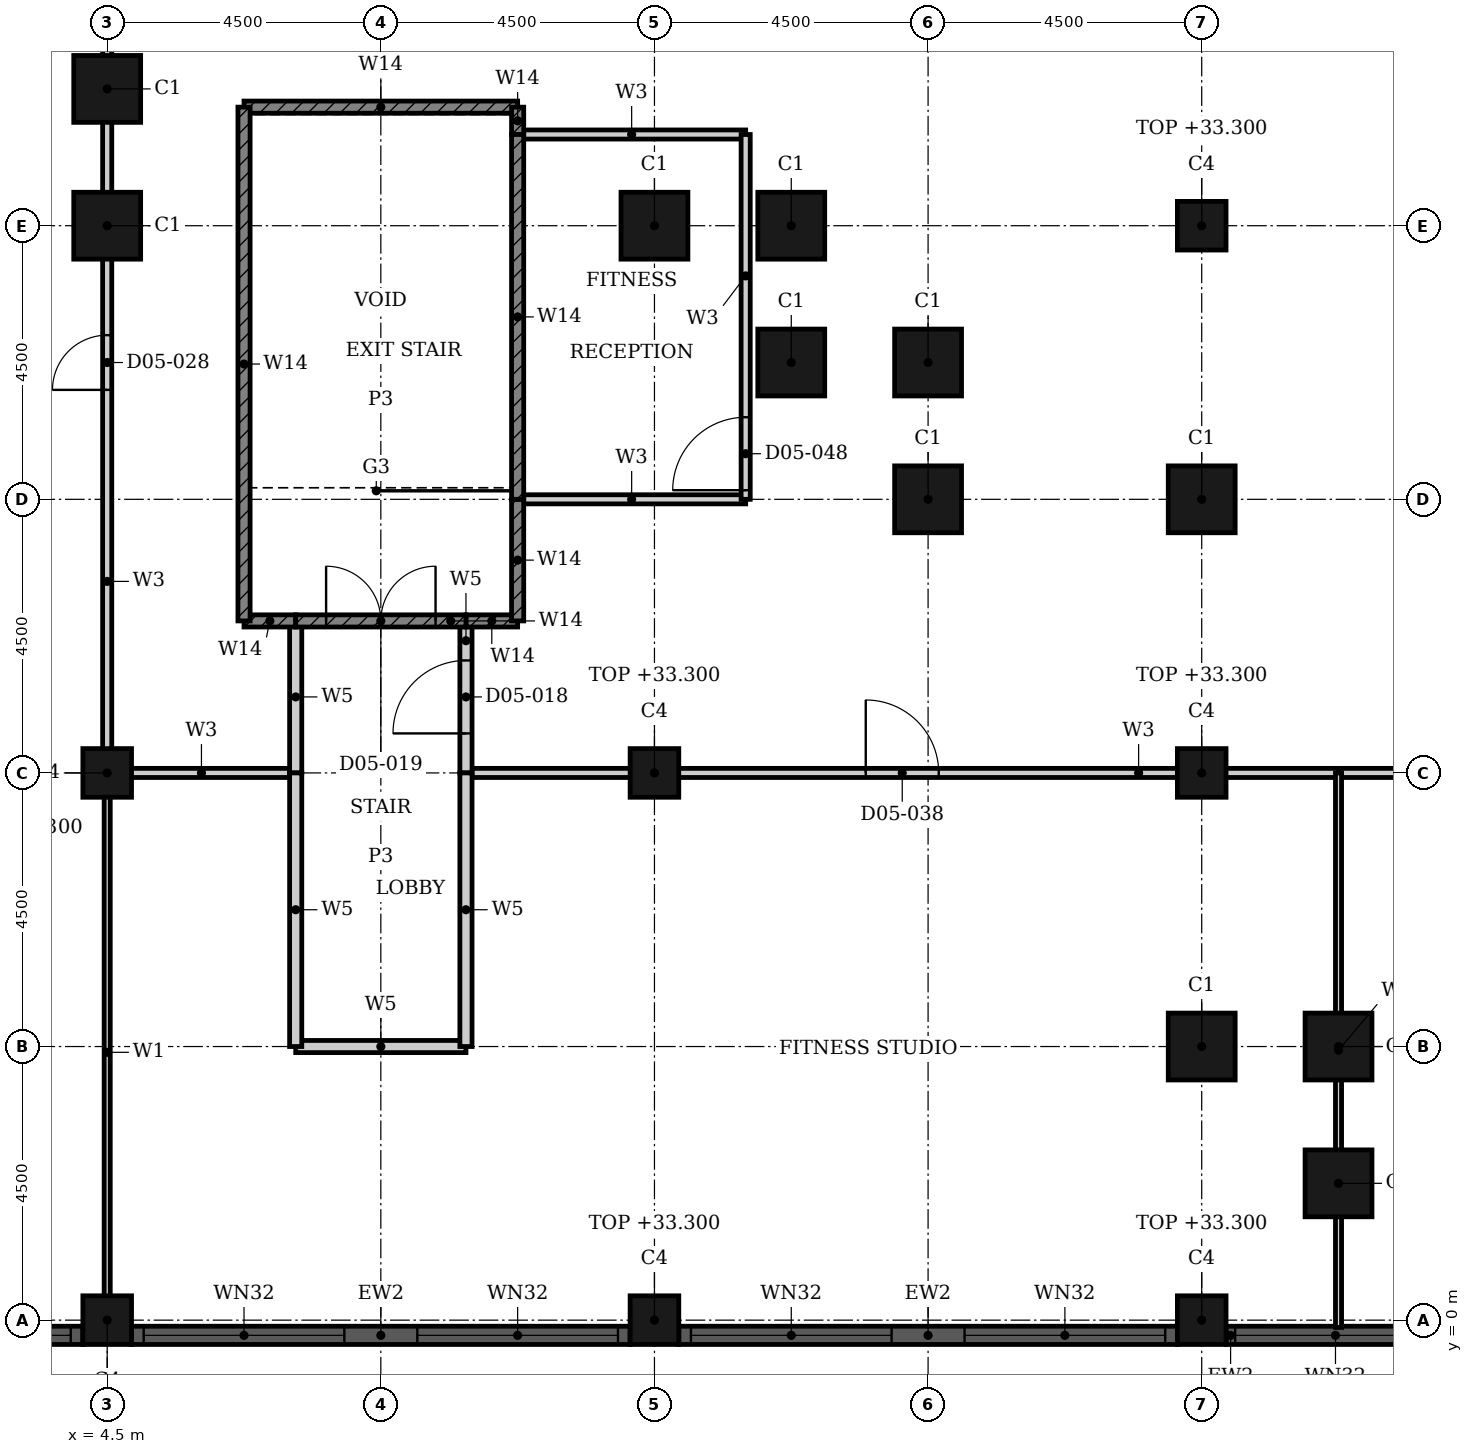
"""IFC4 building model, lengths in metres.
Left out: names, types, materials, properties, quantities, classifications, styles, units other than length and angle.
Written with IfcOpenShell. Run it as: python <this file> out.ifc"""

import sys

from ifc_helpers import new_model, si_unit, direction, frame, frame_2d, origin, origin_2d, place, context, subcontext, project, spatial, rectangle, hollow_rectangle, extrude, element, fill, save


model = new_model("IFC4")
c1 = context("Model", 3, precision=1e-05, world=origin(), true_north=direction((0.0, 1.0)))
c2 = subcontext(c1, "Body", "Model", "MODEL_VIEW")
j1 = project(units=[si_unit("LENGTHUNIT", "METRE"), si_unit("PLANEANGLEUNIT", "RADIAN")], contexts=[c1])
p1 = place(None, origin())
s1 = spatial("IfcSite", under=j1, at=p1, CompositionType="ELEMENT")
p2 = place(p1, origin())
s2 = spatial("IfcBuilding", under=s1, at=p2, CompositionType="ELEMENT")
p3 = place(p2, frame((0.0, 0.0, 28.8)))
s3 = spatial("IfcBuildingStorey", under=s2, at=p3, CompositionType="ELEMENT", Elevation=28.8)
for number, where, z_axis, x_axis in (
    (1, (22.5, 4.5, 0.0), (0.0, 0.0, 1.0), (1.0, 0.0, 0.0)),
    (2, (24.75, 4.5, 0.0), (0.0, 0.0, 1.0), (1.0, 0.0, 0.0)),
    (3, (24.75, 2.25, 0.0), (0.0, 0.0, 1.0), (1.0, 0.0, 0.0)),
    (4, (4.5, 20.25, 0.0), (0.0, 0.0, 1.0), (1.0, 0.0, 0.0)),
    (5, (4.5, 18.0, 0.0), (0.0, 0.0, 1.0), (1.0, 0.0, 0.0)),
    (6, (13.5, 18.0, 0.0), (0.0, 0.0, 1.0), (1.0, 0.0, 0.0)),
    (7, (15.75, 18.0, 0.0), (0.0, 0.0, 1.0), (1.0, 0.0, 0.0)),
    (8, (15.75, 15.75, 0.0), (0.0, 0.0, 1.0), (1.0, 0.0, 0.0)),
    (9, (18.0, 15.75, 0.0), (0.0, 0.0, 1.0), (1.0, 0.0, 0.0)),
    (10, (18.0, 13.5, 0.0), (0.0, 0.0, 1.0), (1.0, 0.0, 0.0)),
    (11, (22.5, 13.5, 0.0), (0.0, 0.0, 1.0), (1.0, 0.0, 0.0)),
):
    element("IfcColumn", number, at=place(p3, frame(where, z_axis=z_axis, x_axis=x_axis)), inside=s3, PredefinedType="COLUMN", context=c2, shape_type="SweptSolid", body=[
        extrude(hollow_rectangle(XDim=1.1, YDim=1.1, WallThickness=0.036, at=origin_2d()), origin(), (0.0, 0.0, 1.0), 4.8),
    ])
for number, where, z_axis, x_axis in (
    (12, (4.5, 0.0, 0.0), (0.0, 0.0, 1.0), (1.0, 0.0, 0.0)),
    (13, (13.5, 0.0, 0.0), (0.0, 0.0, 1.0), (1.0, 0.0, 0.0)),
    (14, (22.5, 0.0, 0.0), (0.0, 0.0, 1.0), (1.0, 0.0, 0.0)),
    (15, (4.5, 9.0, 0.0), (0.0, 0.0, 1.0), (1.0, 0.0, 0.0)),
    (16, (13.5, 9.0, 0.0), (0.0, 0.0, 1.0), (1.0, 0.0, 0.0)),
    (17, (22.5, 9.0, 0.0), (0.0, 0.0, 1.0), (1.0, 0.0, 0.0)),
    (18, (22.5, 18.0, 0.0), (0.0, 0.0, 1.0), (1.0, 0.0, 0.0)),
):
    element("IfcColumn", number, at=place(p3, frame(where, z_axis=z_axis, x_axis=x_axis)), inside=s3, PredefinedType="COLUMN", context=c2, shape_type="SweptSolid", body=[
        extrude(hollow_rectangle(XDim=0.8, YDim=0.8, WallThickness=0.025, at=origin_2d()), origin(), (0.0, 0.0, 1.0), 4.5),
    ])
p4 = place(p3, frame((-4.1, -0.25, 0.0), z_axis=(0.0, 0.0, 1.0), x_axis=(1.0, 0.0, 0.0)))
e19 = element("IfcWall", 19, at=p4, inside=s3, PredefinedType="SOLIDWALL", context=c2, shape_type="SweptSolid", body=[
    extrude(rectangle(XDim=8.2, YDim=0.3, at=frame_2d((4.1, 0.0))), origin(), (0.0, 0.0, 1.0), 4.8),
])
p5 = place(p4, frame((0.2, 0.0, 0.9)))
e20 = element("IfcOpeningElement", 20, at=p5, cuts=e19, PredefinedType="OPENING", context=c2, shape_type="SweptSolid", body=[
    extrude(rectangle(XDim=3.3, YDim=2.9, at=frame_2d((1.65, 1.45))), frame((0.0, 0.16, 0.0), z_axis=(0.0, -1.0, 0.0), x_axis=(1.0, 0.0, 0.0)), (0.0, 0.0, 1.0), 0.32),
])
p6 = place(p4, frame((4.7, 0.0, 0.9)))
e21 = element("IfcOpeningElement", 21, at=p6, cuts=e19, PredefinedType="OPENING", context=c2, shape_type="SweptSolid", body=[
    extrude(rectangle(XDim=3.3, YDim=2.9, at=frame_2d((1.65, 1.45))), frame((0.0, 0.16, 0.0), z_axis=(0.0, -1.0, 0.0), x_axis=(1.0, 0.0, 0.0)), (0.0, 0.0, 1.0), 0.32),
])
p7 = place(p3, frame((4.9, -0.25, 0.0), z_axis=(0.0, 0.0, 1.0), x_axis=(1.0, 0.0, 0.0)))
e22 = element("IfcWall", 22, at=p7, inside=s3, PredefinedType="SOLIDWALL", context=c2, shape_type="SweptSolid", body=[
    extrude(rectangle(XDim=8.2, YDim=0.3, at=frame_2d((4.1, 0.0))), origin(), (0.0, 0.0, 1.0), 4.8),
])
p8 = place(p7, frame((0.2, 0.0, 0.9)))
e23 = element("IfcOpeningElement", 23, at=p8, cuts=e22, PredefinedType="OPENING", context=c2, shape_type="SweptSolid", body=[
    extrude(rectangle(XDim=3.3, YDim=2.9, at=frame_2d((1.65, 1.45))), frame((0.0, 0.16, 0.0), z_axis=(0.0, -1.0, 0.0), x_axis=(1.0, 0.0, 0.0)), (0.0, 0.0, 1.0), 0.32),
])
p9 = place(p7, frame((4.7, 0.0, 0.9)))
e24 = element("IfcOpeningElement", 24, at=p9, cuts=e22, PredefinedType="OPENING", context=c2, shape_type="SweptSolid", body=[
    extrude(rectangle(XDim=3.3, YDim=2.9, at=frame_2d((1.65, 1.45))), frame((0.0, 0.16, 0.0), z_axis=(0.0, -1.0, 0.0), x_axis=(1.0, 0.0, 0.0)), (0.0, 0.0, 1.0), 0.32),
])
p10 = place(p3, frame((13.9, -0.25, 0.0), z_axis=(0.0, 0.0, 1.0), x_axis=(1.0, 0.0, 0.0)))
e25 = element("IfcWall", 25, at=p10, inside=s3, PredefinedType="SOLIDWALL", context=c2, shape_type="SweptSolid", body=[
    extrude(rectangle(XDim=8.2, YDim=0.3, at=frame_2d((4.1, 0.0))), origin(), (0.0, 0.0, 1.0), 4.8),
])
p11 = place(p10, frame((0.2, 0.0, 0.9)))
e26 = element("IfcOpeningElement", 26, at=p11, cuts=e25, PredefinedType="OPENING", context=c2, shape_type="SweptSolid", body=[
    extrude(rectangle(XDim=3.3, YDim=2.9, at=frame_2d((1.65, 1.45))), frame((0.0, 0.16, 0.0), z_axis=(0.0, -1.0, 0.0), x_axis=(1.0, 0.0, 0.0)), (0.0, 0.0, 1.0), 0.32),
])
p12 = place(p10, frame((4.7, 0.0, 0.9)))
e27 = element("IfcOpeningElement", 27, at=p12, cuts=e25, PredefinedType="OPENING", context=c2, shape_type="SweptSolid", body=[
    extrude(rectangle(XDim=3.3, YDim=2.9, at=frame_2d((1.65, 1.45))), frame((0.0, 0.16, 0.0), z_axis=(0.0, -1.0, 0.0), x_axis=(1.0, 0.0, 0.0)), (0.0, 0.0, 1.0), 0.32),
])
p13 = place(p3, frame((22.9, -0.25, 0.0), z_axis=(0.0, 0.0, 1.0), x_axis=(1.0, 0.0, 0.0)))
e28 = element("IfcWall", 28, at=p13, inside=s3, PredefinedType="SOLIDWALL", context=c2, shape_type="SweptSolid", body=[
    extrude(rectangle(XDim=3.55, YDim=0.3, at=frame_2d((1.775, 0.0))), origin(), (0.0, 0.0, 1.0), 4.8),
])
p14 = place(p13, frame((0.15, 0.0, 0.9)))
e29 = element("IfcOpeningElement", 29, at=p14, cuts=e28, PredefinedType="OPENING", context=c2, shape_type="SweptSolid", body=[
    extrude(rectangle(XDim=3.3, YDim=2.9, at=frame_2d((1.65, 1.45))), frame((0.0, 0.16, 0.0), z_axis=(0.0, -1.0, 0.0), x_axis=(1.0, 0.0, 0.0)), (0.0, 0.0, 1.0), 0.32),
])
for number, where, z_axis, x_axis in (
    (30, (11.25, 13.5, 0.0), (0.0, 0.0, 1.0), (1.0, 0.0, 0.0)),
    (31, (11.25, 19.5, 0.0), (0.0, 0.0, 1.0), (1.0, 0.0, 0.0)),
):
    element("IfcWall", number, at=place(p3, frame(where, z_axis=z_axis, x_axis=x_axis)), inside=s3, PredefinedType="PARTITIONING", context=c2, shape_type="SweptSolid", body=[
        extrude(rectangle(XDim=3.75, YDim=0.15, at=frame_2d((1.875, 0.0))), origin(), (0.0, 0.0, 1.0), 4.5),
    ])
p15 = place(p3, frame((4.5, 9.0, 0.0), z_axis=(0.0, 0.0, 1.0), x_axis=(1.0, 0.0, 0.0)))
e32 = element("IfcWall", 32, at=p15, inside=s3, PredefinedType="PARTITIONING", context=c2, shape_type="SweptSolid", body=[
    extrude(rectangle(XDim=3.1, YDim=0.15, at=frame_2d((1.55, 0.0))), origin(), (0.0, 0.0, 1.0), 4.5),
])
p16 = place(p3, frame((10.4, 9.0, 0.0), z_axis=(0.0, 0.0, 1.0), x_axis=(1.0, 0.0, 0.0)))
e33 = element("IfcWall", 33, at=p16, inside=s3, PredefinedType="PARTITIONING", context=c2, shape_type="SweptSolid", body=[
    extrude(rectangle(XDim=14.35, YDim=0.15, at=frame_2d((7.175, 0.0))), origin(), (0.0, 0.0, 1.0), 4.5),
])
p17 = place(p16, frame((6.575, 0.0, 0.0)))
e34 = element("IfcOpeningElement", 34, at=p17, cuts=e33, PredefinedType="OPENING", context=c2, shape_type="SweptSolid", body=[
    extrude(rectangle(XDim=1.2, YDim=2.4, at=frame_2d((0.6, 1.2))), frame((0.0, 0.085, 0.0), z_axis=(0.0, -1.0, 0.0), x_axis=(1.0, 0.0, 0.0)), (0.0, 0.0, 1.0), 0.17),
])
p18 = place(p3, frame((24.75, 9.0, 0.0), z_axis=(0.0, 0.0, 1.0), x_axis=(1.0, 0.0, 0.0)))
e35 = element("IfcWall", 35, at=p18, inside=s3, PredefinedType="PARTITIONING", context=c2, shape_type="SweptSolid", body=[
    extrude(rectangle(XDim=13.5, YDim=0.15, at=frame_2d((6.75, 0.0))), origin(), (0.0, 0.0, 1.0), 4.5),
])
p19 = place(p18, frame((4.8, 0.0, 0.0)))
e36 = element("IfcOpeningElement", 36, at=p19, cuts=e35, PredefinedType="OPENING", context=c2, shape_type="SweptSolid", body=[
    extrude(rectangle(XDim=1.2, YDim=2.4, at=frame_2d((0.6, 1.2))), frame((0.0, 0.085, 0.0), z_axis=(0.0, -1.0, 0.0), x_axis=(1.0, 0.0, 0.0)), (0.0, 0.0, 1.0), 0.17),
])
p20 = place(p3, frame((15.0, 13.5, 0.0), z_axis=(0.0, 0.0, 1.0), x_axis=(0.0, 1.0, 0.0)))
e37 = element("IfcWall", 37, at=p20, inside=s3, PredefinedType="PARTITIONING", context=c2, shape_type="SweptSolid", body=[
    extrude(rectangle(XDim=6.0, YDim=0.15, at=frame_2d((3.0, 0.0))), origin(), (0.0, 0.0, 1.0), 4.5),
])
p21 = place(p20, frame((0.15, 0.0, 0.0)))
e38 = element("IfcOpeningElement", 38, at=p21, cuts=e37, PredefinedType="OPENING", context=c2, shape_type="SweptSolid", body=[
    extrude(rectangle(XDim=1.2, YDim=2.4, at=frame_2d((0.6, 1.2))), frame((0.0, 0.085, 0.0), z_axis=(0.0, -1.0, 0.0), x_axis=(1.0, 0.0, 0.0)), (0.0, 0.0, 1.0), 0.17),
])
p22 = place(p3, frame((4.5, 9.0, 0.0), z_axis=(0.0, 0.0, 1.0), x_axis=(0.0, 1.0, 0.0)))
e39 = element("IfcWall", 39, at=p22, inside=s3, PredefinedType="PARTITIONING", context=c2, shape_type="SweptSolid", body=[
    extrude(rectangle(XDim=13.5, YDim=0.15, at=frame_2d((6.75, 0.0))), origin(), (0.0, 0.0, 1.0), 3.88),
])
p23 = place(p22, frame((6.3, 0.0, 0.0)))
e40 = element("IfcOpeningElement", 40, at=p23, cuts=e39, PredefinedType="OPENING", context=c2, shape_type="SweptSolid", body=[
    extrude(rectangle(XDim=0.9, YDim=2.1, at=frame_2d((0.45, 1.05))), frame((0.0, 0.085, 0.0), z_axis=(0.0, -1.0, 0.0), x_axis=(1.0, 0.0, 0.0)), (0.0, 0.0, 1.0), 0.17),
])
p24 = place(p3, frame((24.75, -0.12, 0.0), z_axis=(0.0, 0.0, 1.0), x_axis=(0.0, 1.0, 0.0)))
e41 = element("IfcWall", 41, at=p24, inside=s3, PredefinedType="PARTITIONING", context=c2, shape_type="SweptSolid", body=[
    extrude(rectangle(XDim=9.12, YDim=0.1, at=frame_2d((4.56, 0.0))), origin(), (0.0, 0.0, 1.0), 3.88),
])
p25 = place(p3, frame((4.5, -0.19, 0.0), z_axis=(0.0, 0.0, 1.0), x_axis=(0.0, 1.0, 0.0)))
e42 = element("IfcWall", 42, at=p25, inside=s3, PredefinedType="PARTITIONING", context=c2, shape_type="SweptSolid", body=[
    extrude(rectangle(XDim=9.19, YDim=0.1, at=frame_2d((4.595, 0.0))), origin(), (0.0, 0.0, 1.0), 4.5),
])
p26 = place(p3, frame((7.6, 4.5, 0.0), z_axis=(0.0, 0.0, 1.0), x_axis=(1.0, 0.0, 0.0)))
e43 = element("IfcWall", 43, at=p26, inside=s3, PredefinedType="PARTITIONING", context=c2, shape_type="SweptSolid", body=[
    extrude(rectangle(XDim=2.8, YDim=0.2, at=frame_2d((1.4, 0.0))), origin(), (0.0, 0.0, 1.0), 4.5),
])
p27 = place(p3, frame((10.4, 9.0, 0.0), z_axis=(0.0, 0.0, 1.0), x_axis=(0.0, 1.0, 0.0)))
e44 = element("IfcWall", 44, at=p27, inside=s3, PredefinedType="PARTITIONING", context=c2, shape_type="SweptSolid", body=[
    extrude(rectangle(XDim=2.5, YDim=0.2, at=frame_2d((1.25, 0.0))), origin(), (0.0, 0.0, 1.0), 4.5),
])
p28 = place(p27, frame((0.65, 0.0, 0.0)))
e45 = element("IfcOpeningElement", 45, at=p28, cuts=e44, PredefinedType="OPENING", context=c2, shape_type="SweptSolid", body=[
    extrude(rectangle(XDim=1.2, YDim=2.1, at=frame_2d((0.6, 1.05))), frame((0.0, 0.11, 0.0), z_axis=(0.0, -1.0, 0.0), x_axis=(1.0, 0.0, 0.0)), (0.0, 0.0, 1.0), 0.22),
])
p29 = place(p3, frame((10.4, 4.5, 0.0), z_axis=(0.0, 0.0, 1.0), x_axis=(0.0, 1.0, 0.0)))
e46 = element("IfcWall", 46, at=p29, inside=s3, PredefinedType="PARTITIONING", context=c2, shape_type="SweptSolid", body=[
    extrude(rectangle(XDim=4.5, YDim=0.2, at=frame_2d((2.25, 0.0))), origin(), (0.0, 0.0, 1.0), 4.5),
])
p30 = place(p3, frame((7.6, 9.0, 0.0), z_axis=(0.0, 0.0, 1.0), x_axis=(0.0, 1.0, 0.0)))
e47 = element("IfcWall", 47, at=p30, inside=s3, PredefinedType="PARTITIONING", context=c2, shape_type="SweptSolid", body=[
    extrude(rectangle(XDim=2.5, YDim=0.2, at=frame_2d((1.25, 0.0))), origin(), (0.0, 0.0, 1.0), 4.5),
])
p31 = place(p3, frame((7.6, 4.5, 0.0), z_axis=(0.0, 0.0, 1.0), x_axis=(0.0, 1.0, 0.0)))
e48 = element("IfcWall", 48, at=p31, inside=s3, PredefinedType="PARTITIONING", context=c2, shape_type="SweptSolid", body=[
    extrude(rectangle(XDim=4.5, YDim=0.2, at=frame_2d((2.25, 0.0))), origin(), (0.0, 0.0, 1.0), 4.5),
])
for number, where, z_axis, x_axis in (
    (49, (6.75, 11.5, 0.0), (0.0, 0.0, 1.0), (1.0, 0.0, 0.0)),
    (50, (10.4, 11.5, 0.0), (0.0, 0.0, 1.0), (1.0, 0.0, 0.0)),
):
    element("IfcWall", number, at=place(p3, frame(where, z_axis=z_axis, x_axis=x_axis)), inside=s3, PredefinedType="SHEAR", context=c2, shape_type="SweptSolid", body=[
        extrude(rectangle(XDim=0.85, YDim=0.2, at=frame_2d((0.425, 0.0))), origin(), (0.0, 0.0, 1.0), 4.5),
    ])
p32 = place(p3, frame((7.6, 11.5, 0.0), z_axis=(0.0, 0.0, 1.0), x_axis=(1.0, 0.0, 0.0)))
e51 = element("IfcWall", 51, at=p32, inside=s3, PredefinedType="SHEAR", context=c2, shape_type="SweptSolid", body=[
    extrude(rectangle(XDim=2.8, YDim=0.2, at=frame_2d((1.4, 0.0))), origin(), (0.0, 0.0, 1.0), 4.5),
])
p33 = place(p32, frame((0.5, 0.0, 0.0)))
e52 = element("IfcOpeningElement", 52, at=p33, cuts=e51, PredefinedType="OPENING", context=c2, shape_type="SweptSolid", body=[
    extrude(rectangle(XDim=1.8, YDim=2.1, at=frame_2d((0.9, 1.05))), frame((0.0, 0.11, 0.0), z_axis=(0.0, -1.0, 0.0), x_axis=(1.0, 0.0, 0.0)), (0.0, 0.0, 1.0), 0.22),
])
p34 = place(p3, frame((6.75, 19.95, 0.0), z_axis=(0.0, 0.0, 1.0), x_axis=(1.0, 0.0, 0.0)))
e53 = element("IfcWall", 53, at=p34, inside=s3, PredefinedType="SHEAR", context=c2, shape_type="SweptSolid", body=[
    extrude(rectangle(XDim=4.5, YDim=0.2, at=frame_2d((2.25, 0.0))), origin(), (0.0, 0.0, 1.0), 4.5),
])
p35 = place(p3, frame((11.25, 11.5, 0.0), z_axis=(0.0, 0.0, 1.0), x_axis=(0.0, 1.0, 0.0)))
e54 = element("IfcWall", 54, at=p35, inside=s3, PredefinedType="SHEAR", context=c2, shape_type="SweptSolid", body=[
    extrude(rectangle(XDim=2.0, YDim=0.2, at=frame_2d((1.0, 0.0))), origin(), (0.0, 0.0, 1.0), 4.5),
])
p36 = place(p3, frame((11.25, 19.5, 0.0), z_axis=(0.0, 0.0, 1.0), x_axis=(0.0, 1.0, 0.0)))
e55 = element("IfcWall", 55, at=p36, inside=s3, PredefinedType="SHEAR", context=c2, shape_type="SweptSolid", body=[
    extrude(rectangle(XDim=0.45, YDim=0.2, at=frame_2d((0.225, 0.0))), origin(), (0.0, 0.0, 1.0), 4.5),
])
p37 = place(p3, frame((11.25, 13.5, 0.0), z_axis=(0.0, 0.0, 1.0), x_axis=(0.0, 1.0, 0.0)))
e56 = element("IfcWall", 56, at=p37, inside=s3, PredefinedType="SHEAR", context=c2, shape_type="SweptSolid", body=[
    extrude(rectangle(XDim=6.0, YDim=0.2, at=frame_2d((3.0, 0.0))), origin(), (0.0, 0.0, 1.0), 4.5),
])
p38 = place(p3, frame((6.75, 11.5, 0.0), z_axis=(0.0, 0.0, 1.0), x_axis=(0.0, 1.0, 0.0)))
e57 = element("IfcWall", 57, at=p38, inside=s3, PredefinedType="SHEAR", context=c2, shape_type="SweptSolid", body=[
    extrude(rectangle(XDim=8.45, YDim=0.2, at=frame_2d((4.225, 0.0))), origin(), (0.0, 0.0, 1.0), 4.5),
])
p39 = place(p6, origin())
e58 = element("IfcWindow", 58, at=p39, inside=s3, PartitioningType="SINGLE_PANEL", PredefinedType="WINDOW", context=c2, shape_type="SweptSolid", body=[
    extrude(rectangle(XDim=3.3, YDim=2.9, at=frame_2d((1.65, 1.45))), frame((0.0, 0.03, 0.0), z_axis=(0.0, -1.0, 0.0), x_axis=(1.0, 0.0, 0.0)), (0.0, 0.0, 1.0), 0.06),
])
fill(e21, e58)
p40 = place(p8, origin())
e59 = element("IfcWindow", 59, at=p40, inside=s3, PartitioningType="SINGLE_PANEL", PredefinedType="WINDOW", context=c2, shape_type="SweptSolid", body=[
    extrude(rectangle(XDim=3.3, YDim=2.9, at=frame_2d((1.65, 1.45))), frame((0.0, 0.03, 0.0), z_axis=(0.0, -1.0, 0.0), x_axis=(1.0, 0.0, 0.0)), (0.0, 0.0, 1.0), 0.06),
])
fill(e23, e59)
p41 = place(p9, origin())
e60 = element("IfcWindow", 60, at=p41, inside=s3, PartitioningType="SINGLE_PANEL", PredefinedType="WINDOW", context=c2, shape_type="SweptSolid", body=[
    extrude(rectangle(XDim=3.3, YDim=2.9, at=frame_2d((1.65, 1.45))), frame((0.0, 0.03, 0.0), z_axis=(0.0, -1.0, 0.0), x_axis=(1.0, 0.0, 0.0)), (0.0, 0.0, 1.0), 0.06),
])
fill(e24, e60)
p42 = place(p11, origin())
e61 = element("IfcWindow", 61, at=p42, inside=s3, PartitioningType="SINGLE_PANEL", PredefinedType="WINDOW", context=c2, shape_type="SweptSolid", body=[
    extrude(rectangle(XDim=3.3, YDim=2.9, at=frame_2d((1.65, 1.45))), frame((0.0, 0.03, 0.0), z_axis=(0.0, -1.0, 0.0), x_axis=(1.0, 0.0, 0.0)), (0.0, 0.0, 1.0), 0.06),
])
fill(e26, e61)
p43 = place(p12, origin())
e62 = element("IfcWindow", 62, at=p43, inside=s3, PartitioningType="SINGLE_PANEL", PredefinedType="WINDOW", context=c2, shape_type="SweptSolid", body=[
    extrude(rectangle(XDim=3.3, YDim=2.9, at=frame_2d((1.65, 1.45))), frame((0.0, 0.03, 0.0), z_axis=(0.0, -1.0, 0.0), x_axis=(1.0, 0.0, 0.0)), (0.0, 0.0, 1.0), 0.06),
])
fill(e27, e62)
p44 = place(p14, origin())
e63 = element("IfcWindow", 63, at=p44, inside=s3, PartitioningType="SINGLE_PANEL", PredefinedType="WINDOW", context=c2, shape_type="SweptSolid", body=[
    extrude(rectangle(XDim=3.3, YDim=2.9, at=frame_2d((1.65, 1.45))), frame((0.0, 0.03, 0.0), z_axis=(0.0, -1.0, 0.0), x_axis=(1.0, 0.0, 0.0)), (0.0, 0.0, 1.0), 0.06),
])
fill(e29, e63)
p45 = place(p28, origin())
e64 = element("IfcDoor", 64, at=p45, inside=s3, OperationType="SINGLE_SWING_LEFT", PredefinedType="DOOR", context=c2, shape_type="SweptSolid", body=[
    extrude(rectangle(XDim=1.2, YDim=2.1, at=frame_2d((0.6, 1.05))), frame((0.0, 0.025, 0.0), z_axis=(0.0, -1.0, 0.0), x_axis=(1.0, 0.0, 0.0)), (0.0, 0.0, 1.0), 0.05),
])
fill(e45, e64)
p46 = place(p33, origin())
e65 = element("IfcDoor", 65, at=p46, inside=s3, OperationType="DOUBLE_DOOR_SINGLE_SWING", PredefinedType="DOOR", context=c2, shape_type="SweptSolid", body=[
    extrude(rectangle(XDim=1.8, YDim=2.1, at=frame_2d((0.9, 1.05))), frame((0.0, 0.025, 0.0), z_axis=(0.0, -1.0, 0.0), x_axis=(1.0, 0.0, 0.0)), (0.0, 0.0, 1.0), 0.05),
])
fill(e52, e65)
p47 = place(p23, origin())
e66 = element("IfcDoor", 66, at=p47, inside=s3, OperationType="SINGLE_SWING_LEFT", PredefinedType="DOOR", context=c2, shape_type="SweptSolid", body=[
    extrude(rectangle(XDim=0.9, YDim=2.1, at=frame_2d((0.45, 1.05))), frame((0.0, 0.025, 0.0), z_axis=(0.0, -1.0, 0.0), x_axis=(1.0, 0.0, 0.0)), (0.0, 0.0, 1.0), 0.05),
])
fill(e40, e66)
p48 = place(p17, origin())
e67 = element("IfcDoor", 67, at=p48, inside=s3, OperationType="SINGLE_SWING_RIGHT", PredefinedType="DOOR", context=c2, shape_type="SweptSolid", body=[
    extrude(rectangle(XDim=1.2, YDim=2.4, at=frame_2d((0.6, 1.2))), frame((0.0, 0.025, 0.0), z_axis=(0.0, -1.0, 0.0), x_axis=(1.0, 0.0, 0.0)), (0.0, 0.0, 1.0), 0.05),
])
fill(e34, e67)
p49 = place(p21, origin())
e68 = element("IfcDoor", 68, at=p49, inside=s3, OperationType="SINGLE_SWING_LEFT", PredefinedType="DOOR", context=c2, shape_type="SweptSolid", body=[
    extrude(rectangle(XDim=1.2, YDim=2.4, at=frame_2d((0.6, 1.2))), frame((0.0, 0.025, 0.0), z_axis=(0.0, -1.0, 0.0), x_axis=(1.0, 0.0, 0.0)), (0.0, 0.0, 1.0), 0.05),
])
fill(e38, e68)
save(model, sys.argv[1])
